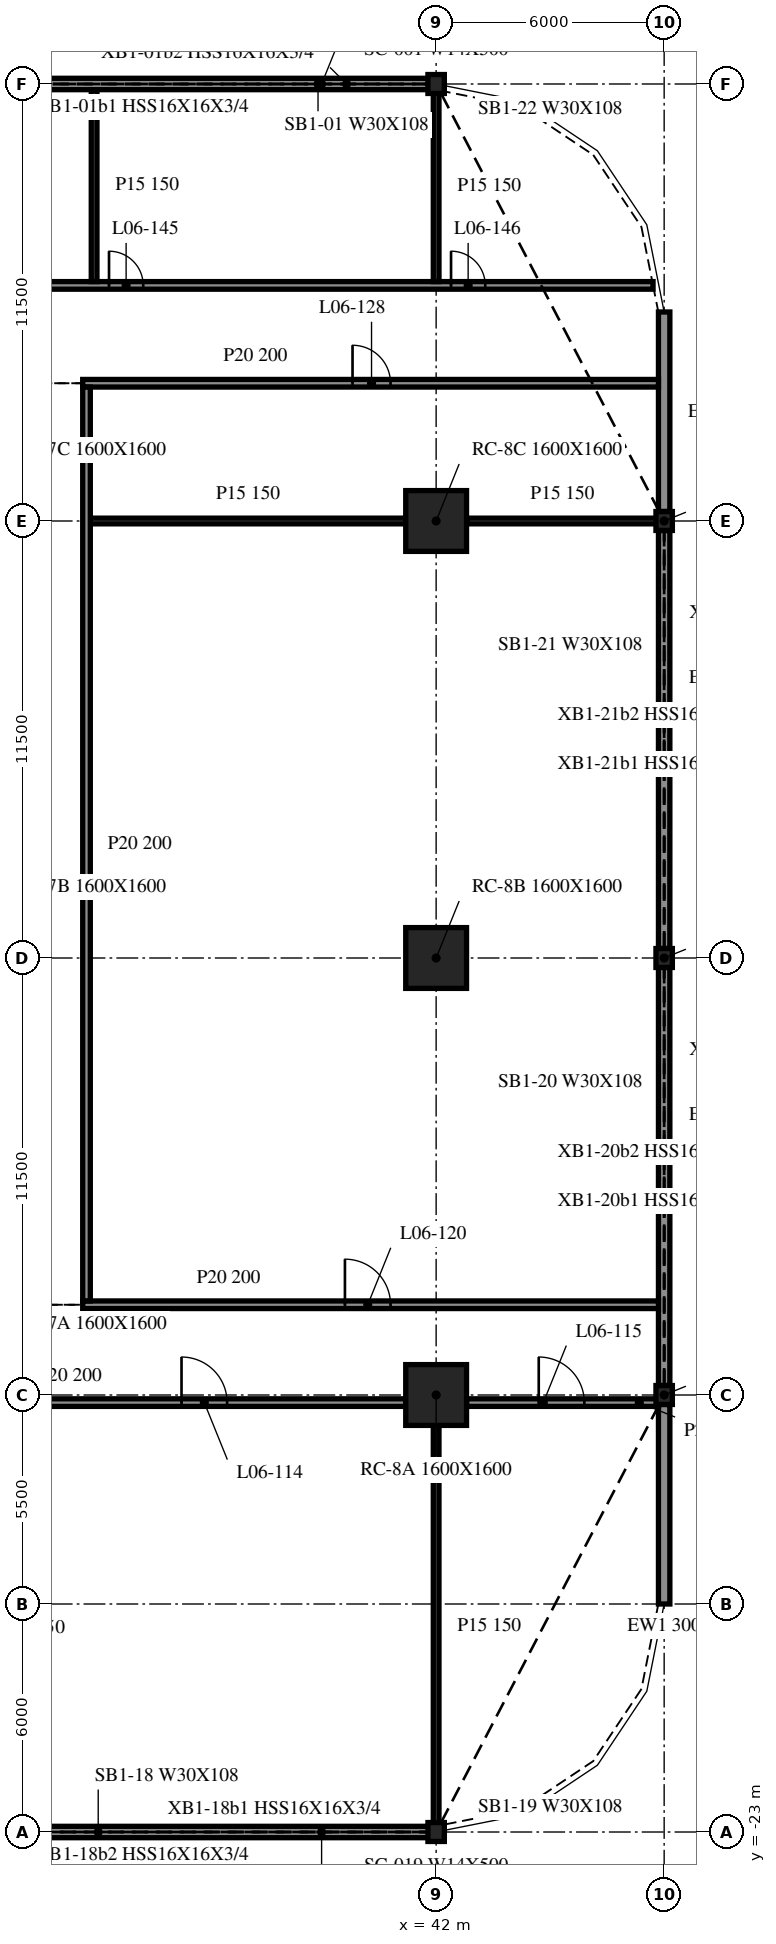
"""IFC4 building model, lengths in metres.
Left out: names, types, materials, properties, quantities, classifications, styles, units other than length and angle.
Written with IfcOpenShell. Run it as: python <this file> out.ifc"""

import sys

from ifc_helpers import new_model, si_unit, direction, frame, frame_2d, origin, origin_2d, place, context, subcontext, project, spatial, rectangle, i_section, extrude, element, fill, save


model = new_model("IFC4")
c1 = context("Model", 3, precision=1e-05, world=origin(), true_north=direction((0.0, 1.0)))
c2 = subcontext(c1, "Body", "Model", "MODEL_VIEW")
j1 = project(units=[si_unit("LENGTHUNIT", "METRE"), si_unit("PLANEANGLEUNIT", "RADIAN")], contexts=[c1])
p1 = place(None, origin())
s1 = spatial("IfcSite", under=j1, at=p1, CompositionType="ELEMENT")
p2 = place(p1, origin())
s2 = spatial("IfcBuilding", under=s1, at=p2, CompositionType="ELEMENT")
p3 = place(p2, frame((0.0, 0.0, 28.7)))
s3 = spatial("IfcBuildingStorey", under=s2, at=p3, CompositionType="ELEMENT", Elevation=28.7)
for number, where, z_axis, x_axis in (
    (1, (42.0, -11.5, -0.34), (0.0, 0.0, 1.0), (1.0, 0.0, 0.0)),
    (2, (42.0, 0.0, -0.34), (0.0, 0.0, 1.0), (1.0, 0.0, 0.0)),
    (3, (42.0, 11.5, -0.34), (0.0, 0.0, 1.0), (1.0, 0.0, 0.0)),
):
    element("IfcColumn", number, at=place(p3, frame(where, z_axis=z_axis, x_axis=x_axis)), inside=s3, PredefinedType="COLUMN", context=c2, shape_type="SweptSolid", body=[
        extrude(rectangle(XDim=1.6, YDim=1.6, at=origin_2d()), origin(), (0.0, 0.0, 1.0), 4.3),
    ])
for number, where, z_axis, x_axis in (
    (4, (42.0, 23.0, -0.34), (0.0, 0.0, 1.0), (1.0, 0.0, 0.0)),
    (5, (42.0, -23.0, -0.34), (0.0, 0.0, 1.0), (1.0, 0.0, 0.0)),
    (6, (48.0, -11.5, -0.34), (0.0, 0.0, 1.0), (1.0, 0.0, 0.0)),
    (7, (48.0, 0.0, -0.34), (0.0, 0.0, 1.0), (1.0, 0.0, 0.0)),
    (8, (48.0, 11.5, -0.34), (0.0, 0.0, 1.0), (1.0, 0.0, 0.0)),
):
    element("IfcColumn", number, at=place(p3, frame(where, z_axis=z_axis, x_axis=x_axis)), inside=s3, PredefinedType="COLUMN", context=c2, shape_type="SweptSolid", body=[
        extrude(i_section(OverallWidth=0.432, OverallDepth=0.498, WebThickness=0.056, FlangeThickness=0.089, at=origin_2d()), origin(), (0.0, 0.0, 1.0), 4.3),
    ])
for number, where, z_axis, x_axis in (
    (9, (41.972, 23.0, 0.0), (0.0, 0.0, 1.0), (-1.0, 0.0, 0.0)),
    (10, (30.028, -23.0, 0.0), (0.0, 0.0, 1.0), (1.0, 0.0, 0.0)),
):
    element("IfcWall", number, at=place(p3, frame(where, z_axis=z_axis, x_axis=x_axis)), inside=s3, PredefinedType="NOTDEFINED", context=c2, shape_type="SweptSolid", body=[
        extrude(rectangle(XDim=11.944, YDim=0.3, at=frame_2d((5.972, 0.0))), origin(), (0.0, 0.0, 1.0), 3.203),
    ])
p4 = place(p3, frame((48.0, -17.0, 0.0), z_axis=(0.0, 0.0, 1.0), x_axis=(0.0, 1.0, 0.0)))
e11 = element("IfcWall", 11, at=p4, inside=s3, PredefinedType="NOTDEFINED", context=c2, shape_type="SweptSolid", body=[
    extrude(rectangle(XDim=5.251, YDim=0.3, at=frame_2d((2.625, 0.0))), origin(), (0.0, 0.0, 1.0), 3.203),
])
for number, where, z_axis, x_axis in (
    (12, (48.0, -11.251, 0.0), (0.0, 0.0, 1.0), (0.0, 1.0, 0.0)),
    (13, (48.0, 0.249, 0.0), (0.0, 0.0, 1.0), (0.0, 1.0, 0.0)),
):
    element("IfcWall", number, at=place(p3, frame(where, z_axis=z_axis, x_axis=x_axis)), inside=s3, PredefinedType="NOTDEFINED", context=c2, shape_type="SweptSolid", body=[
        extrude(rectangle(XDim=11.002, YDim=0.3, at=frame_2d((5.501, 0.0))), origin(), (0.0, 0.0, 1.0), 3.203),
    ])
p5 = place(p3, frame((48.0, 11.749, 0.0), z_axis=(0.0, 0.0, 1.0), x_axis=(0.0, 1.0, 0.0)))
e14 = element("IfcWall", 14, at=p5, inside=s3, PredefinedType="NOTDEFINED", context=c2, shape_type="SweptSolid", body=[
    extrude(rectangle(XDim=5.251, YDim=0.3, at=frame_2d((2.625, 0.0))), origin(), (0.0, 0.0, 1.0), 3.203),
])
p6 = place(p3, frame((30.8, -11.7, 0.0), z_axis=(0.0, 0.0, 1.0), x_axis=(1.0, 0.0, 0.0)))
e15 = element("IfcWall", 15, at=p6, inside=s3, PredefinedType="PARTITIONING", context=c2, shape_type="SweptSolid", body=[
    extrude(rectangle(XDim=10.4, YDim=0.2, at=frame_2d((5.2, 0.0))), origin(), (0.0, 0.0, 1.0), 3.96),
])
p7 = place(p6, frame((4.5, 0.0, 0.0)))
e16 = element("IfcOpeningElement", 16, at=p7, cuts=e15, PredefinedType="OPENING", context=c2, shape_type="SweptSolid", body=[
    extrude(rectangle(XDim=1.2, YDim=2.1, at=frame_2d((0.6, 1.05))), frame((0.0, 0.11, 0.0), z_axis=(0.0, -1.0, 0.0), x_axis=(1.0, 0.0, 0.0)), (0.0, 0.0, 1.0), 0.22),
])
p8 = place(p3, frame((42.8, -11.7, 0.0), z_axis=(0.0, 0.0, 1.0), x_axis=(1.0, 0.0, 0.0)))
e17 = element("IfcWall", 17, at=p8, inside=s3, PredefinedType="PARTITIONING", context=c2, shape_type="SweptSolid", body=[
    extrude(rectangle(XDim=5.05, YDim=0.2, at=frame_2d((2.525, 0.0))), origin(), (0.0, 0.0, 1.0), 3.96),
])
p9 = place(p8, frame((1.9, 0.0, 0.0)))
e18 = element("IfcOpeningElement", 18, at=p9, cuts=e17, PredefinedType="OPENING", context=c2, shape_type="SweptSolid", body=[
    extrude(rectangle(XDim=1.2, YDim=2.1, at=frame_2d((0.6, 1.05))), frame((0.0, 0.11, 0.0), z_axis=(0.0, -1.0, 0.0), x_axis=(1.0, 0.0, 0.0)), (0.0, 0.0, 1.0), 0.22),
])
p10 = place(p3, frame((32.7, -9.125, 0.0), z_axis=(0.0, 0.0, 1.0), x_axis=(1.0, 0.0, 0.0)))
e19 = element("IfcWall", 19, at=p10, inside=s3, PredefinedType="PARTITIONING", context=c2, shape_type="SweptSolid", body=[
    extrude(rectangle(XDim=15.15, YDim=0.2, at=frame_2d((7.575, 0.0))), origin(), (0.0, 0.0, 1.0), 3.96),
])
p11 = place(p10, frame((6.9, 0.0, 0.0)))
e20 = element("IfcOpeningElement", 20, at=p11, cuts=e19, PredefinedType="OPENING", context=c2, shape_type="SweptSolid", body=[
    extrude(rectangle(XDim=1.2, YDim=2.1, at=frame_2d((0.6, 1.05))), frame((0.0, 0.11, 0.0), z_axis=(0.0, -1.0, 0.0), x_axis=(1.0, 0.0, 0.0)), (0.0, 0.0, 1.0), 0.22),
])
p12 = place(p3, frame((32.9, 11.5, 0.0), z_axis=(0.0, 0.0, 1.0), x_axis=(1.0, 0.0, 0.0)))
e21 = element("IfcWall", 21, at=p12, inside=s3, PredefinedType="PARTITIONING", context=c2, shape_type="SweptSolid", body=[
    extrude(rectangle(XDim=8.3, YDim=0.15, at=frame_2d((4.15, 0.0))), origin(), (0.0, 0.0, 1.0), 3.96),
])
p13 = place(p3, frame((42.8, 11.5, 0.0), z_axis=(0.0, 0.0, 1.0), x_axis=(1.0, 0.0, 0.0)))
e22 = element("IfcWall", 22, at=p13, inside=s3, PredefinedType="PARTITIONING", context=c2, shape_type="SweptSolid", body=[
    extrude(rectangle(XDim=5.05, YDim=0.15, at=frame_2d((2.525, 0.0))), origin(), (0.0, 0.0, 1.0), 3.96),
])
p14 = place(p3, frame((32.7, 15.125, 0.0), z_axis=(0.0, 0.0, 1.0), x_axis=(1.0, 0.0, 0.0)))
e23 = element("IfcWall", 23, at=p14, inside=s3, PredefinedType="PARTITIONING", context=c2, shape_type="SweptSolid", body=[
    extrude(rectangle(XDim=15.15, YDim=0.2, at=frame_2d((7.575, 0.0))), origin(), (0.0, 0.0, 1.0), 3.96),
])
p15 = place(p14, frame((7.1, 0.0, 0.0)))
e24 = element("IfcOpeningElement", 24, at=p15, cuts=e23, PredefinedType="OPENING", context=c2, shape_type="SweptSolid", body=[
    extrude(rectangle(XDim=1.0, YDim=2.1, at=frame_2d((0.5, 1.05))), frame((0.0, 0.11, 0.0), z_axis=(0.0, -1.0, 0.0), x_axis=(1.0, 0.0, 0.0)), (0.0, 0.0, 1.0), 0.22),
])
p16 = place(p3, frame((-47.708, 17.7, 0.0), z_axis=(0.0, 0.0, 1.0), x_axis=(1.0, 0.0, 0.0)))
e25 = element("IfcWall", 25, at=p16, inside=s3, PredefinedType="PARTITIONING", context=c2, shape_type="SweptSolid", body=[
    extrude(rectangle(XDim=95.416, YDim=0.2, at=frame_2d((47.708, 0.0))), origin(), (0.0, 0.0, 1.0), 3.96),
])
p17 = place(p16, frame((4.5, 0.0, 0.0)))
e26 = element("IfcOpeningElement", 26, at=p17, cuts=e25, PredefinedType="OPENING", context=c2, shape_type="SweptSolid", body=[
    extrude(rectangle(XDim=0.9, YDim=2.1, at=frame_2d((0.45, 1.05))), frame((0.0, 0.11, 0.0), z_axis=(0.0, -1.0, 0.0), x_axis=(1.0, 0.0, 0.0)), (0.0, 0.0, 1.0), 0.22),
])
p18 = place(p16, frame((7.5, 0.0, 0.0)))
e27 = element("IfcOpeningElement", 27, at=p18, cuts=e25, PredefinedType="OPENING", context=c2, shape_type="SweptSolid", body=[
    extrude(rectangle(XDim=0.9, YDim=2.1, at=frame_2d((0.45, 1.05))), frame((0.0, 0.11, 0.0), z_axis=(0.0, -1.0, 0.0), x_axis=(1.0, 0.0, 0.0)), (0.0, 0.0, 1.0), 0.22),
])
p19 = place(p16, frame((13.5, 0.0, 0.0)))
e28 = element("IfcOpeningElement", 28, at=p19, cuts=e25, PredefinedType="OPENING", context=c2, shape_type="SweptSolid", body=[
    extrude(rectangle(XDim=0.9, YDim=2.1, at=frame_2d((0.45, 1.05))), frame((0.0, 0.11, 0.0), z_axis=(0.0, -1.0, 0.0), x_axis=(1.0, 0.0, 0.0)), (0.0, 0.0, 1.0), 0.22),
])
p20 = place(p16, frame((19.5, 0.0, 0.0)))
e29 = element("IfcOpeningElement", 29, at=p20, cuts=e25, PredefinedType="OPENING", context=c2, shape_type="SweptSolid", body=[
    extrude(rectangle(XDim=0.9, YDim=2.1, at=frame_2d((0.45, 1.05))), frame((0.0, 0.11, 0.0), z_axis=(0.0, -1.0, 0.0), x_axis=(1.0, 0.0, 0.0)), (0.0, 0.0, 1.0), 0.22),
])
p21 = place(p16, frame((28.5, 0.0, 0.0)))
e30 = element("IfcOpeningElement", 30, at=p21, cuts=e25, PredefinedType="OPENING", context=c2, shape_type="SweptSolid", body=[
    extrude(rectangle(XDim=0.9, YDim=2.1, at=frame_2d((0.45, 1.05))), frame((0.0, 0.11, 0.0), z_axis=(0.0, -1.0, 0.0), x_axis=(1.0, 0.0, 0.0)), (0.0, 0.0, 1.0), 0.22),
])
p22 = place(p16, frame((31.5, 0.0, 0.0)))
e31 = element("IfcOpeningElement", 31, at=p22, cuts=e25, PredefinedType="OPENING", context=c2, shape_type="SweptSolid", body=[
    extrude(rectangle(XDim=0.9, YDim=2.1, at=frame_2d((0.45, 1.05))), frame((0.0, 0.11, 0.0), z_axis=(0.0, -1.0, 0.0), x_axis=(1.0, 0.0, 0.0)), (0.0, 0.0, 1.0), 0.22),
])
p23 = place(p16, frame((34.5, 0.0, 0.0)))
e32 = element("IfcOpeningElement", 32, at=p23, cuts=e25, PredefinedType="OPENING", context=c2, shape_type="SweptSolid", body=[
    extrude(rectangle(XDim=0.9, YDim=2.1, at=frame_2d((0.45, 1.05))), frame((0.0, 0.11, 0.0), z_axis=(0.0, -1.0, 0.0), x_axis=(1.0, 0.0, 0.0)), (0.0, 0.0, 1.0), 0.22),
])
p24 = place(p16, frame((37.5, 0.0, 0.0)))
e33 = element("IfcOpeningElement", 33, at=p24, cuts=e25, PredefinedType="OPENING", context=c2, shape_type="SweptSolid", body=[
    extrude(rectangle(XDim=0.9, YDim=2.1, at=frame_2d((0.45, 1.05))), frame((0.0, 0.11, 0.0), z_axis=(0.0, -1.0, 0.0), x_axis=(1.0, 0.0, 0.0)), (0.0, 0.0, 1.0), 0.22),
])
p25 = place(p16, frame((43.5, 0.0, 0.0)))
e34 = element("IfcOpeningElement", 34, at=p25, cuts=e25, PredefinedType="OPENING", context=c2, shape_type="SweptSolid", body=[
    extrude(rectangle(XDim=0.9, YDim=2.1, at=frame_2d((0.45, 1.05))), frame((0.0, 0.11, 0.0), z_axis=(0.0, -1.0, 0.0), x_axis=(1.0, 0.0, 0.0)), (0.0, 0.0, 1.0), 0.22),
])
p26 = place(p16, frame((47.3, 0.0, 0.0)))
e35 = element("IfcOpeningElement", 35, at=p26, cuts=e25, PredefinedType="OPENING", context=c2, shape_type="SweptSolid", body=[
    extrude(rectangle(XDim=0.9, YDim=2.1, at=frame_2d((0.45, 1.05))), frame((0.0, 0.11, 0.0), z_axis=(0.0, -1.0, 0.0), x_axis=(1.0, 0.0, 0.0)), (0.0, 0.0, 1.0), 0.22),
])
p27 = place(p16, frame((51.1, 0.0, 0.0)))
e36 = element("IfcOpeningElement", 36, at=p27, cuts=e25, PredefinedType="OPENING", context=c2, shape_type="SweptSolid", body=[
    extrude(rectangle(XDim=0.9, YDim=2.1, at=frame_2d((0.45, 1.05))), frame((0.0, 0.11, 0.0), z_axis=(0.0, -1.0, 0.0), x_axis=(1.0, 0.0, 0.0)), (0.0, 0.0, 1.0), 0.22),
])
p28 = place(p16, frame((60.1, 0.0, 0.0)))
e37 = element("IfcOpeningElement", 37, at=p28, cuts=e25, PredefinedType="OPENING", context=c2, shape_type="SweptSolid", body=[
    extrude(rectangle(XDim=0.9, YDim=2.1, at=frame_2d((0.45, 1.05))), frame((0.0, 0.11, 0.0), z_axis=(0.0, -1.0, 0.0), x_axis=(1.0, 0.0, 0.0)), (0.0, 0.0, 1.0), 0.22),
])
p29 = place(p16, frame((63.1, 0.0, 0.0)))
e38 = element("IfcOpeningElement", 38, at=p29, cuts=e25, PredefinedType="OPENING", context=c2, shape_type="SweptSolid", body=[
    extrude(rectangle(XDim=0.9, YDim=2.1, at=frame_2d((0.45, 1.05))), frame((0.0, 0.11, 0.0), z_axis=(0.0, -1.0, 0.0), x_axis=(1.0, 0.0, 0.0)), (0.0, 0.0, 1.0), 0.22),
])
p30 = place(p16, frame((66.1, 0.0, 0.0)))
e39 = element("IfcOpeningElement", 39, at=p30, cuts=e25, PredefinedType="OPENING", context=c2, shape_type="SweptSolid", body=[
    extrude(rectangle(XDim=0.9, YDim=2.1, at=frame_2d((0.45, 1.05))), frame((0.0, 0.11, 0.0), z_axis=(0.0, -1.0, 0.0), x_axis=(1.0, 0.0, 0.0)), (0.0, 0.0, 1.0), 0.22),
])
p31 = place(p16, frame((69.1, 0.0, 0.0)))
e40 = element("IfcOpeningElement", 40, at=p31, cuts=e25, PredefinedType="OPENING", context=c2, shape_type="SweptSolid", body=[
    extrude(rectangle(XDim=0.9, YDim=2.1, at=frame_2d((0.45, 1.05))), frame((0.0, 0.11, 0.0), z_axis=(0.0, -1.0, 0.0), x_axis=(1.0, 0.0, 0.0)), (0.0, 0.0, 1.0), 0.22),
])
p32 = place(p16, frame((75.1, 0.0, 0.0)))
e41 = element("IfcOpeningElement", 41, at=p32, cuts=e25, PredefinedType="OPENING", context=c2, shape_type="SweptSolid", body=[
    extrude(rectangle(XDim=0.9, YDim=2.1, at=frame_2d((0.45, 1.05))), frame((0.0, 0.11, 0.0), z_axis=(0.0, -1.0, 0.0), x_axis=(1.0, 0.0, 0.0)), (0.0, 0.0, 1.0), 0.22),
])
p33 = place(p16, frame((81.1, 0.0, 0.0)))
e42 = element("IfcOpeningElement", 42, at=p33, cuts=e25, PredefinedType="OPENING", context=c2, shape_type="SweptSolid", body=[
    extrude(rectangle(XDim=0.9, YDim=2.1, at=frame_2d((0.45, 1.05))), frame((0.0, 0.11, 0.0), z_axis=(0.0, -1.0, 0.0), x_axis=(1.0, 0.0, 0.0)), (0.0, 0.0, 1.0), 0.22),
])
p34 = place(p16, frame((90.1, 0.0, 0.0)))
e43 = element("IfcOpeningElement", 43, at=p34, cuts=e25, PredefinedType="OPENING", context=c2, shape_type="SweptSolid", body=[
    extrude(rectangle(XDim=0.9, YDim=2.1, at=frame_2d((0.45, 1.05))), frame((0.0, 0.11, 0.0), z_axis=(0.0, -1.0, 0.0), x_axis=(1.0, 0.0, 0.0)), (0.0, 0.0, 1.0), 0.22),
])
p35 = place(p3, frame((32.8, -9.025, 0.0), z_axis=(0.0, 0.0, 1.0), x_axis=(0.0, 1.0, 0.0)))
e44 = element("IfcWall", 44, at=p35, inside=s3, PredefinedType="PARTITIONING", context=c2, shape_type="SweptSolid", body=[
    extrude(rectangle(XDim=24.05, YDim=0.2, at=frame_2d((12.025, 0.0))), origin(), (0.0, 0.0, 1.0), 3.96),
])
p36 = place(p3, frame((33.0, 17.8, 0.0), z_axis=(0.0, 0.0, 1.0), x_axis=(0.0, 1.0, 0.0)))
e45 = element("IfcWall", 45, at=p36, inside=s3, PredefinedType="PARTITIONING", context=c2, shape_type="SweptSolid", body=[
    extrude(rectangle(XDim=5.05, YDim=0.15, at=frame_2d((2.525, 0.0))), origin(), (0.0, 0.0, 1.0), 3.96),
])
p37 = place(p3, frame((42.0, -22.847, 0.0), z_axis=(0.0, 0.0, 1.0), x_axis=(0.0, 1.0, 0.0)))
e46 = element("IfcWall", 46, at=p37, inside=s3, PredefinedType="PARTITIONING", context=c2, shape_type="SweptSolid", body=[
    extrude(rectangle(XDim=10.547, YDim=0.15, at=frame_2d((5.273, 0.0))), origin(), (0.0, 0.0, 1.0), 3.96),
])
p38 = place(p3, frame((42.0, 17.8, 0.0), z_axis=(0.0, 0.0, 1.0), x_axis=(0.0, 1.0, 0.0)))
e47 = element("IfcWall", 47, at=p38, inside=s3, PredefinedType="PARTITIONING", context=c2, shape_type="SweptSolid", body=[
    extrude(rectangle(XDim=5.047, YDim=0.15, at=frame_2d((2.523, 0.0))), origin(), (0.0, 0.0, 1.0), 3.96),
])
p39 = place(p7, origin())
e48 = element("IfcDoor", 48, at=p39, inside=s3, OperationType="SINGLE_SWING_RIGHT", PredefinedType="DOOR", context=c2, shape_type="SweptSolid", body=[
    extrude(rectangle(XDim=1.2, YDim=2.1, at=frame_2d((0.6, 1.05))), frame((0.0, 0.025, 0.0), z_axis=(0.0, -1.0, 0.0), x_axis=(1.0, 0.0, 0.0)), (0.0, 0.0, 1.0), 0.05),
])
fill(e16, e48)
p40 = place(p9, origin())
e49 = element("IfcDoor", 49, at=p40, inside=s3, OperationType="SINGLE_SWING_RIGHT", PredefinedType="DOOR", context=c2, shape_type="SweptSolid", body=[
    extrude(rectangle(XDim=1.2, YDim=2.1, at=frame_2d((0.6, 1.05))), frame((0.0, 0.025, 0.0), z_axis=(0.0, -1.0, 0.0), x_axis=(1.0, 0.0, 0.0)), (0.0, 0.0, 1.0), 0.05),
])
fill(e18, e49)
p41 = place(p11, origin())
e50 = element("IfcDoor", 50, at=p41, inside=s3, OperationType="SINGLE_SWING_LEFT", PredefinedType="DOOR", context=c2, shape_type="SweptSolid", body=[
    extrude(rectangle(XDim=1.2, YDim=2.1, at=frame_2d((0.6, 1.05))), frame((0.0, 0.025, 0.0), z_axis=(0.0, -1.0, 0.0), x_axis=(1.0, 0.0, 0.0)), (0.0, 0.0, 1.0), 0.05),
])
fill(e20, e50)
p42 = place(p15, origin())
e51 = element("IfcDoor", 51, at=p42, inside=s3, OperationType="SINGLE_SWING_LEFT", PredefinedType="DOOR", context=c2, shape_type="SweptSolid", body=[
    extrude(rectangle(XDim=1.0, YDim=2.1, at=frame_2d((0.5, 1.05))), frame((0.0, 0.025, 0.0), z_axis=(0.0, -1.0, 0.0), x_axis=(1.0, 0.0, 0.0)), (0.0, 0.0, 1.0), 0.05),
])
fill(e24, e51)
p43 = place(p33, origin())
e52 = element("IfcDoor", 52, at=p43, inside=s3, OperationType="SINGLE_SWING_RIGHT", PredefinedType="DOOR", context=c2, shape_type="SweptSolid", body=[
    extrude(rectangle(XDim=0.9, YDim=2.1, at=frame_2d((0.45, 1.05))), frame((0.0, 0.025, 0.0), z_axis=(0.0, -1.0, 0.0), x_axis=(1.0, 0.0, 0.0)), (0.0, 0.0, 1.0), 0.05),
])
fill(e42, e52)
p44 = place(p34, origin())
e53 = element("IfcDoor", 53, at=p44, inside=s3, OperationType="SINGLE_SWING_RIGHT", PredefinedType="DOOR", context=c2, shape_type="SweptSolid", body=[
    extrude(rectangle(XDim=0.9, YDim=2.1, at=frame_2d((0.45, 1.05))), frame((0.0, 0.025, 0.0), z_axis=(0.0, -1.0, 0.0), x_axis=(1.0, 0.0, 0.0)), (0.0, 0.0, 1.0), 0.05),
])
fill(e43, e53)
save(model, sys.argv[1])
